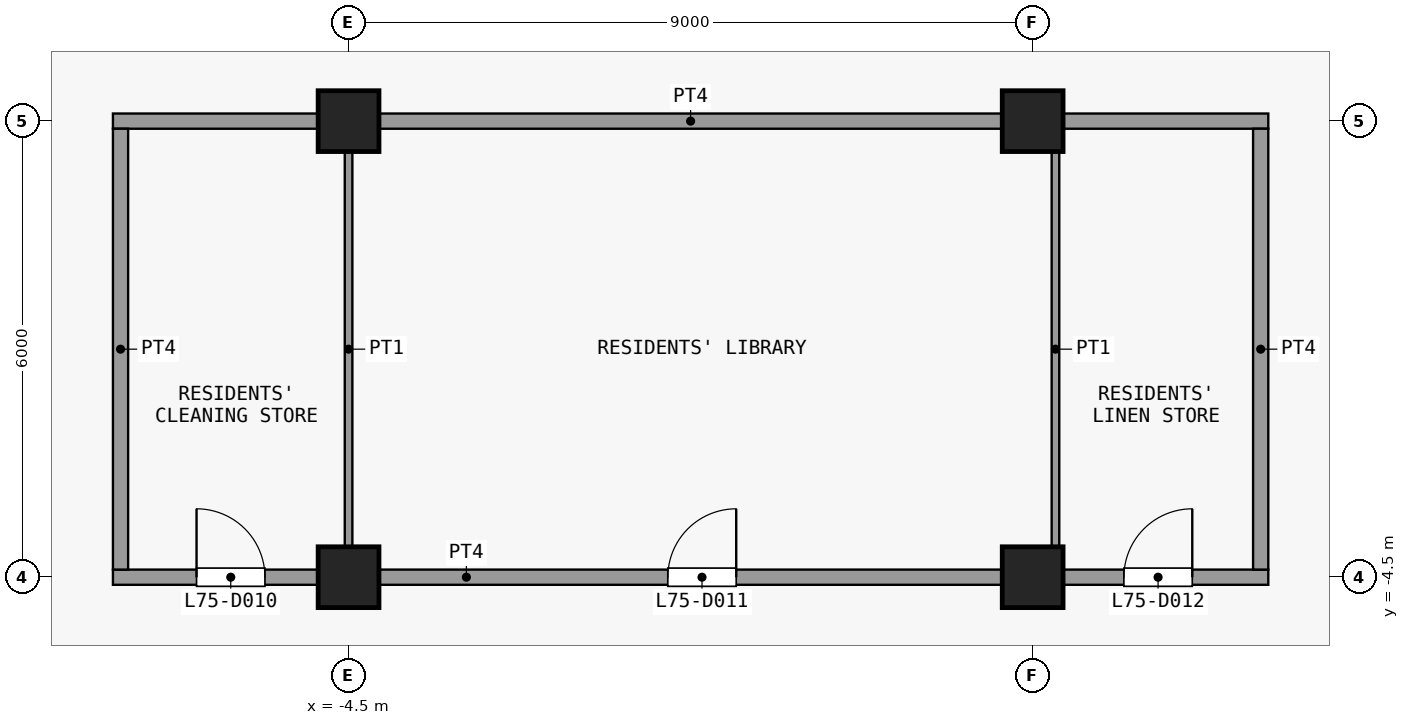
"""IFC4 building model, lengths in metres.
Left out: names, types, materials, properties, quantities, classifications, styles, units other than length and angle.
Written with IfcOpenShell. Run it as: python <this file> out.ifc"""

import sys

from ifc_helpers import new_model, si_unit, direction, frame, frame_2d, origin, origin_2d, place, context, subcontext, project, spatial, rectangle, extrude, element, fill, save


model = new_model("IFC4")
c1 = context("Model", 3, precision=1e-05, world=origin(), true_north=direction((0.0, 1.0)))
c2 = subcontext(c1, "Body", "Model", "MODEL_VIEW")
j1 = project(units=[si_unit("LENGTHUNIT", "METRE"), si_unit("PLANEANGLEUNIT", "RADIAN")], contexts=[c1])
p1 = place(None, origin())
s1 = spatial("IfcSite", under=j1, at=p1, CompositionType="ELEMENT")
p2 = place(p1, origin())
s2 = spatial("IfcBuilding", under=s1, at=p2, CompositionType="ELEMENT")
p3 = place(p2, frame((0.0, 0.0, 295.1)))
s3 = spatial("IfcBuildingStorey", under=s2, at=p3, CompositionType="ELEMENT", Elevation=295.1)
for number, where, z_axis, x_axis in (
    (1, (-4.5, -4.5, 0.0), (0.0, 0.0, 1.0), (1.0, 0.0, 0.0)),
    (2, (-4.5, 1.5, 0.0), (0.0, 0.0, 1.0), (1.0, 0.0, 0.0)),
    (3, (4.5, -4.5, 0.0), (0.0, 0.0, 1.0), (1.0, 0.0, 0.0)),
    (4, (4.5, 1.5, 0.0), (0.0, 0.0, 1.0), (1.0, 0.0, 0.0)),
):
    element("IfcColumn", number, at=place(p3, frame(where, z_axis=z_axis, x_axis=x_axis)), inside=s3, PredefinedType="COLUMN", context=c2, shape_type="SweptSolid", body=[
        extrude(rectangle(XDim=0.8, YDim=0.8, at=origin_2d()), origin(), (0.0, 0.0, 1.0), 3.6),
    ])
p4 = place(p3, frame((-7.6, -4.5, 0.0), z_axis=(0.0, 0.0, 1.0), x_axis=(1.0, 0.0, 0.0)))
e5 = element("IfcWall", 5, at=p4, inside=s3, PredefinedType="PARTITIONING", context=c2, shape_type="SweptSolid", body=[
    extrude(rectangle(XDim=15.2, YDim=0.2, at=frame_2d((7.6, 0.0))), origin(), (0.0, 0.0, 1.0), 3.2),
])
p5 = place(p4, frame((1.1, 0.0, 0.0)))
e6 = element("IfcOpeningElement", 6, at=p5, cuts=e5, PredefinedType="OPENING", context=c2, shape_type="SweptSolid", body=[
    extrude(rectangle(XDim=0.9, YDim=2.1, at=frame_2d((0.45, 1.05))), frame((0.0, 0.11, 0.0), z_axis=(0.0, -1.0, 0.0), x_axis=(1.0, 0.0, 0.0)), (0.0, 0.0, 1.0), 0.22),
])
p6 = place(p4, frame((7.3, 0.0, 0.0)))
e7 = element("IfcOpeningElement", 7, at=p6, cuts=e5, PredefinedType="OPENING", context=c2, shape_type="SweptSolid", body=[
    extrude(rectangle(XDim=0.9, YDim=2.1, at=frame_2d((0.45, 1.05))), frame((0.0, 0.11, 0.0), z_axis=(0.0, -1.0, 0.0), x_axis=(1.0, 0.0, 0.0)), (0.0, 0.0, 1.0), 0.22),
])
p7 = place(p4, frame((13.3, 0.0, 0.0)))
e8 = element("IfcOpeningElement", 8, at=p7, cuts=e5, PredefinedType="OPENING", context=c2, shape_type="SweptSolid", body=[
    extrude(rectangle(XDim=0.9, YDim=2.1, at=frame_2d((0.45, 1.05))), frame((0.0, 0.11, 0.0), z_axis=(0.0, -1.0, 0.0), x_axis=(1.0, 0.0, 0.0)), (0.0, 0.0, 1.0), 0.22),
])
p8 = place(p3, frame((-7.6, 1.5, 0.0), z_axis=(0.0, 0.0, 1.0), x_axis=(1.0, 0.0, 0.0)))
e9 = element("IfcWall", 9, at=p8, inside=s3, PredefinedType="PARTITIONING", context=c2, shape_type="SweptSolid", body=[
    extrude(rectangle(XDim=15.2, YDim=0.2, at=frame_2d((7.6, 0.0))), origin(), (0.0, 0.0, 1.0), 3.2),
])
p9 = place(p3, frame((-7.5, -4.4, 0.0), z_axis=(0.0, 0.0, 1.0), x_axis=(0.0, 1.0, 0.0)))
e10 = element("IfcWall", 10, at=p9, inside=s3, PredefinedType="PARTITIONING", context=c2, shape_type="SweptSolid", body=[
    extrude(rectangle(XDim=5.8, YDim=0.2, at=frame_2d((2.9, 0.0))), origin(), (0.0, 0.0, 1.0), 3.2),
])
for number, where, z_axis, x_axis in (
    (11, (-4.5, -4.4, 0.0), (0.0, 0.0, 1.0), (0.0, 1.0, 0.0)),
    (12, (4.8, -4.4, 0.0), (0.0, 0.0, 1.0), (0.0, 1.0, 0.0)),
):
    element("IfcWall", number, at=place(p3, frame(where, z_axis=z_axis, x_axis=x_axis)), inside=s3, PredefinedType="PARTITIONING", context=c2, shape_type="SweptSolid", body=[
        extrude(rectangle(XDim=5.8, YDim=0.1, at=frame_2d((2.9, 0.0))), origin(), (0.0, 0.0, 1.0), 3.2),
    ])
p10 = place(p3, frame((7.5, -4.4, 0.0), z_axis=(0.0, 0.0, 1.0), x_axis=(0.0, 1.0, 0.0)))
e13 = element("IfcWall", 13, at=p10, inside=s3, PredefinedType="PARTITIONING", context=c2, shape_type="SweptSolid", body=[
    extrude(rectangle(XDim=5.8, YDim=0.2, at=frame_2d((2.9, 0.0))), origin(), (0.0, 0.0, 1.0), 3.2),
])
p11 = place(p5, origin())
e14 = element("IfcDoor", 14, at=p11, inside=s3, OperationType="SINGLE_SWING_RIGHT", PredefinedType="DOOR", context=c2, shape_type="SweptSolid", body=[
    extrude(rectangle(XDim=0.9, YDim=2.1, at=frame_2d((0.45, 1.05))), frame((0.0, 0.025, 0.0), z_axis=(0.0, -1.0, 0.0), x_axis=(1.0, 0.0, 0.0)), (0.0, 0.0, 1.0), 0.05),
])
fill(e6, e14)
p12 = place(p6, origin())
e15 = element("IfcDoor", 15, at=p12, inside=s3, OperationType="SINGLE_SWING_LEFT", PredefinedType="DOOR", context=c2, shape_type="SweptSolid", body=[
    extrude(rectangle(XDim=0.9, YDim=2.1, at=frame_2d((0.45, 1.05))), frame((0.0, 0.025, 0.0), z_axis=(0.0, -1.0, 0.0), x_axis=(1.0, 0.0, 0.0)), (0.0, 0.0, 1.0), 0.05),
])
fill(e7, e15)
p13 = place(p7, origin())
e16 = element("IfcDoor", 16, at=p13, inside=s3, OperationType="SINGLE_SWING_LEFT", PredefinedType="DOOR", context=c2, shape_type="SweptSolid", body=[
    extrude(rectangle(XDim=0.9, YDim=2.1, at=frame_2d((0.45, 1.05))), frame((0.0, 0.025, 0.0), z_axis=(0.0, -1.0, 0.0), x_axis=(1.0, 0.0, 0.0)), (0.0, 0.0, 1.0), 0.05),
])
fill(e8, e16)
save(model, sys.argv[1])
